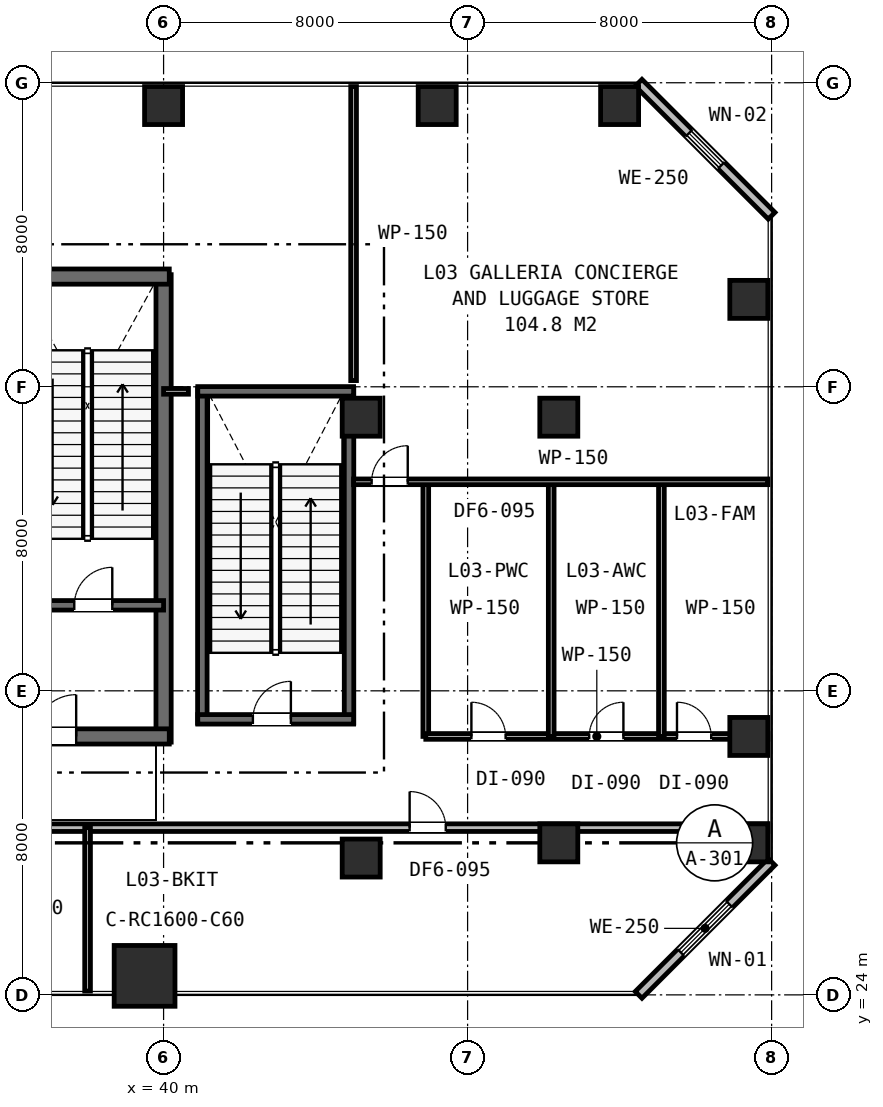
"""IFC4 building model, lengths in metres.
Left out: names, types, materials, properties, quantities, classifications, styles, units other than length and angle.
Written with IfcOpenShell. Run it as: python <this file> out.ifc"""

import sys

from ifc_helpers import new_model, si_unit, direction, frame, frame_2d, origin, origin_2d, place, context, subcontext, project, spatial, rectangle, extrude, element, fill, save


model = new_model("IFC4")
c1 = context("Model", 3, precision=1e-05, world=origin(), true_north=direction((0.0, 1.0)))
c2 = subcontext(c1, "Body", "Model", "MODEL_VIEW")
j1 = project(units=[si_unit("LENGTHUNIT", "METRE"), si_unit("PLANEANGLEUNIT", "RADIAN")], contexts=[c1])
p1 = place(None, origin())
s1 = spatial("IfcSite", under=j1, at=p1, CompositionType="ELEMENT")
p2 = place(p1, origin())
s2 = spatial("IfcBuilding", under=s1, at=p2, CompositionType="ELEMENT")
p3 = place(p2, frame((0.0, 0.0, 15.9)))
s3 = spatial("IfcBuildingStorey", under=s2, at=p3, CompositionType="ELEMENT", Elevation=15.9)
p4 = place(p3, frame((40.0, 30.65, 0.0), z_axis=(0.0, 0.0, 1.0), x_axis=(0.0, 1.0, 0.0)))
e1 = element("IfcWall", 1, at=p4, inside=s3, PredefinedType="SHEAR", context=c2, shape_type="SweptSolid", body=[
    extrude(rectangle(XDim=12.3, YDim=0.4, at=frame_2d((6.15, 0.0))), origin(), (0.0, 0.0, 1.0), 5.4),
])
p5 = place(p3, frame((15.85, 42.9, 0.0), z_axis=(0.0, 0.0, 1.0), x_axis=(1.0, 0.0, 0.0)))
e2 = element("IfcWall", 2, at=p5, inside=s3, PredefinedType="SHEAR", context=c2, shape_type="SweptSolid", body=[
    extrude(rectangle(XDim=24.3, YDim=0.4, at=frame_2d((12.15, 0.0))), origin(), (0.0, 0.0, 1.0), 5.4),
])
p6 = place(p3, frame((28.95, 30.8, 0.0), z_axis=(0.0, 0.0, 1.0), x_axis=(1.0, 0.0, 0.0)))
e3 = element("IfcWall", 3, at=p6, inside=s3, PredefinedType="SHEAR", context=c2, shape_type="SweptSolid", body=[
    extrude(rectangle(XDim=11.2, YDim=0.4, at=frame_2d((5.6, 0.0))), origin(), (0.0, 0.0, 1.0), 5.4),
])
p7 = place(p6, frame((7.65, 0.0, 0.0)))
e4 = element("IfcOpeningElement", 4, at=p7, cuts=e3, PredefinedType="OPENING", context=c2, shape_type="SweptSolid", body=[
    extrude(rectangle(XDim=1.1, YDim=2.15, at=frame_2d((0.55, 1.075))), frame((0.0, 0.21, 0.0), z_axis=(0.0, -1.0, 0.0), x_axis=(1.0, 0.0, 0.0)), (0.0, 0.0, 1.0), 0.42),
])
p8 = place(p3, frame((33.95, 34.25, 0.0), z_axis=(0.0, 0.0, 1.0), x_axis=(1.0, 0.0, 0.0)))
e5 = element("IfcWall", 5, at=p8, inside=s3, PredefinedType="SHEAR", context=c2, shape_type="SweptSolid", body=[
    extrude(rectangle(XDim=6.05, YDim=0.25, at=frame_2d((3.025, 0.0))), origin(), (0.0, 0.0, 1.0), 5.4),
])
p9 = place(p8, frame((3.7, 0.0, 0.0)))
e6 = element("IfcOpeningElement", 6, at=p9, cuts=e5, PredefinedType="OPENING", context=c2, shape_type="SweptSolid", body=[
    extrude(rectangle(XDim=1.0, YDim=2.15, at=frame_2d((0.5, 1.075))), frame((0.0, 0.135, 0.0), z_axis=(0.0, -1.0, 0.0), x_axis=(1.0, 0.0, 0.0)), (0.0, 0.0, 1.0), 0.27),
])
p10 = place(p8, frame((0.55, 0.0, 0.0)))
e7 = element("IfcOpeningElement", 7, at=p10, cuts=e5, PredefinedType="OPENING", context=c2, shape_type="SweptSolid", body=[
    extrude(rectangle(XDim=1.1, YDim=2.15, at=frame_2d((0.55, 1.075))), frame((0.0, 0.135, 0.0), z_axis=(0.0, -1.0, 0.0), x_axis=(1.0, 0.0, 0.0)), (0.0, 0.0, 1.0), 0.27),
])
for number, where, z_axis, x_axis in (
    (8, (41.02, 31.15, 0.0), (0.0, 0.0, 1.0), (0.0, 1.0, 0.0)),
    (9, (44.88, 31.15, 0.0), (0.0, 0.0, 1.0), (0.0, 1.0, 0.0)),
):
    element("IfcWall", number, at=place(p3, frame(where, z_axis=z_axis, x_axis=x_axis)), inside=s3, PredefinedType="SHEAR", context=c2, shape_type="SweptSolid", body=[
        extrude(rectangle(XDim=8.8, YDim=0.25, at=frame_2d((4.4, 0.0))), origin(), (0.0, 0.0, 1.0), 5.4),
    ])
p11 = place(p3, frame((40.9, 39.88, 0.0), z_axis=(0.0, 0.0, 1.0), x_axis=(1.0, 0.0, 0.0)))
e10 = element("IfcWall", 10, at=p11, inside=s3, PredefinedType="SHEAR", context=c2, shape_type="SweptSolid", body=[
    extrude(rectangle(XDim=4.1, YDim=0.25, at=frame_2d((2.05, 0.0))), origin(), (0.0, 0.0, 1.0), 5.4),
])
p12 = place(p3, frame((40.9, 31.25, 0.0), z_axis=(0.0, 0.0, 1.0), x_axis=(1.0, 0.0, 0.0)))
e11 = element("IfcWall", 11, at=p12, inside=s3, PredefinedType="SHEAR", context=c2, shape_type="SweptSolid", body=[
    extrude(rectangle(XDim=4.1, YDim=0.25, at=frame_2d((2.05, 0.0))), origin(), (0.0, 0.0, 1.0), 5.4),
])
p13 = place(p12, frame((1.45, 0.0, 0.0)))
e12 = element("IfcOpeningElement", 12, at=p13, cuts=e11, PredefinedType="OPENING", context=c2, shape_type="SweptSolid", body=[
    extrude(rectangle(XDim=1.0, YDim=2.15, at=frame_2d((0.5, 1.075))), frame((0.0, 0.135, 0.0), z_axis=(0.0, -1.0, 0.0), x_axis=(1.0, 0.0, 0.0)), (0.0, 0.0, 1.0), 0.27),
])
p14 = place(p3, frame((39.5, 24.5, 0.0), z_axis=(0.0, 0.0, 1.0), x_axis=(1.0, 0.0, 0.0)))
e13 = element("IfcColumn", 13, at=p14, inside=s3, PredefinedType="COLUMN", context=c2, shape_type="SweptSolid", body=[
    extrude(rectangle(XDim=1.6, YDim=1.6, at=origin_2d()), origin(), (0.0, 0.0, 1.0), 5.4),
])
for number, where, z_axis, x_axis in (
    (14, (45.2, 27.6, 0.0), (0.0, 0.0, 1.0), (1.0, 0.0, 0.0)),
    (15, (45.2, 39.2, 0.0), (0.0, 0.0, 1.0), (1.0, 0.0, 0.0)),
    (16, (40.0, 47.4, 0.0), (0.0, 0.0, 1.0), (1.0, 0.0, 0.0)),
    (17, (47.2, 47.4, 0.0), (0.0, 0.0, 1.0), (1.0, 0.0, 0.0)),
    (18, (50.4, 28.0, 0.0), (0.0, 0.0, 1.0), (1.0, 0.0, 0.0)),
    (19, (50.4, 39.2, 0.0), (0.0, 0.0, 1.0), (1.0, 0.0, 0.0)),
    (20, (55.4, 28.0, 0.0), (0.0, 0.0, 1.0), (1.0, 0.0, 0.0)),
    (21, (55.4, 30.8, 0.0), (0.0, 0.0, 1.0), (1.0, 0.0, 0.0)),
    (22, (55.4, 42.3, 0.0), (0.0, 0.0, 1.0), (1.0, 0.0, 0.0)),
    (23, (52.0, 47.4, 0.0), (0.0, 0.0, 1.0), (1.0, 0.0, 0.0)),
):
    element("IfcColumn", number, at=place(p3, frame(where, z_axis=z_axis, x_axis=x_axis)), inside=s3, PredefinedType="COLUMN", context=c2, shape_type="SweptSolid", body=[
        extrude(rectangle(XDim=1.0, YDim=1.0, at=origin_2d()), origin(), (0.0, 0.0, 1.0), 5.4),
    ])
p15 = place(p3, frame((52.5, 24.0, 0.0), z_axis=(0.0, 0.0, 1.0), x_axis=(0.707106781187, 0.707106781187, 0.0)))
e24 = element("IfcWall", 24, at=p15, inside=s3, PredefinedType="STANDARD", context=c2, shape_type="SweptSolid", body=[
    extrude(rectangle(XDim=4.95, YDim=0.25, at=frame_2d((2.475, 0.0))), origin(), (0.0, 0.0, 1.0), 4.94),
])
p16 = place(p15, frame((1.575, 0.0, 0.75)))
e25 = element("IfcOpeningElement", 25, at=p16, cuts=e24, PredefinedType="OPENING", context=c2, shape_type="SweptSolid", body=[
    extrude(rectangle(XDim=1.8, YDim=1.85, at=frame_2d((0.9, 0.925))), frame((0.0, 0.135, 0.0), z_axis=(0.0, -1.0, 0.0), x_axis=(1.0, 0.0, 0.0)), (0.0, 0.0, 1.0), 0.27),
])
p17 = place(p3, frame((56.0, 44.5, 0.0), z_axis=(0.0, 0.0, 1.0), x_axis=(-0.707106781187, 0.707106781187, 0.0)))
e26 = element("IfcWall", 26, at=p17, inside=s3, PredefinedType="STANDARD", context=c2, shape_type="SweptSolid", body=[
    extrude(rectangle(XDim=4.95, YDim=0.25, at=frame_2d((2.475, 0.0))), origin(), (0.0, 0.0, 1.0), 4.94),
])
p18 = place(p17, frame((1.875, 0.0, 0.85)))
e27 = element("IfcOpeningElement", 27, at=p18, cuts=e26, PredefinedType="OPENING", context=c2, shape_type="SweptSolid", body=[
    extrude(rectangle(XDim=1.2, YDim=1.6, at=frame_2d((0.6, 0.8))), frame((0.0, 0.135, 0.0), z_axis=(0.0, -1.0, 0.0), x_axis=(1.0, 0.0, 0.0)), (0.0, 0.0, 1.0), 0.27),
])
p19 = place(p3, frame((46.9, 30.8, 0.0), z_axis=(0.0, 0.0, 1.0), x_axis=(0.0, 1.0, 0.0)))
e28 = element("IfcWall", 28, at=p19, inside=s3, PredefinedType="PARTITIONING", context=c2, shape_type="SweptSolid", body=[
    extrude(rectangle(XDim=6.7, YDim=0.15, at=frame_2d((3.35, 0.0))), origin(), (0.0, 0.0, 1.0), 4.29),
])
p20 = place(p3, frame((46.9, 30.8, 0.0), z_axis=(0.0, 0.0, 1.0), x_axis=(1.0, 0.0, 0.0)))
e29 = element("IfcWall", 29, at=p20, inside=s3, PredefinedType="PARTITIONING", context=c2, shape_type="SweptSolid", body=[
    extrude(rectangle(XDim=9.0, YDim=0.15, at=frame_2d((4.5, 0.0))), origin(), (0.0, 0.0, 1.0), 2.98),
])
p21 = place(p20, frame((1.2, 0.0, 0.0)))
e30 = element("IfcOpeningElement", 30, at=p21, cuts=e29, PredefinedType="OPENING", context=c2, shape_type="SweptSolid", body=[
    extrude(rectangle(XDim=0.9, YDim=2.15, at=frame_2d((0.45, 1.075))), frame((0.0, 0.085, 0.0), z_axis=(0.0, -1.0, 0.0), x_axis=(1.0, 0.0, 0.0)), (0.0, 0.0, 1.0), 0.17),
])
p22 = place(p20, frame((4.3, 0.0, 0.0)))
e31 = element("IfcOpeningElement", 31, at=p22, cuts=e29, PredefinedType="OPENING", context=c2, shape_type="SweptSolid", body=[
    extrude(rectangle(XDim=0.9, YDim=2.15, at=frame_2d((0.45, 1.075))), frame((0.0, 0.085, 0.0), z_axis=(0.0, -1.0, 0.0), x_axis=(1.0, 0.0, 0.0)), (0.0, 0.0, 1.0), 0.17),
])
p23 = place(p20, frame((6.61, 0.0, 0.0)))
e32 = element("IfcOpeningElement", 32, at=p23, cuts=e29, PredefinedType="OPENING", context=c2, shape_type="SweptSolid", body=[
    extrude(rectangle(XDim=0.9, YDim=2.15, at=frame_2d((0.45, 1.075))), frame((0.0, 0.085, 0.0), z_axis=(0.0, -1.0, 0.0), x_axis=(1.0, 0.0, 0.0)), (0.0, 0.0, 1.0), 0.17),
])
p24 = place(p3, frame((50.2, 30.8, 0.0), z_axis=(0.0, 0.0, 1.0), x_axis=(0.0, 1.0, 0.0)))
e33 = element("IfcWall", 33, at=p24, inside=s3, PredefinedType="PARTITIONING", context=c2, shape_type="SweptSolid", body=[
    extrude(rectangle(XDim=6.7, YDim=0.15, at=frame_2d((3.35, 0.0))), origin(), (0.0, 0.0, 1.0), 2.98),
])
p25 = place(p3, frame((53.1, 30.8, 0.0), z_axis=(0.0, 0.0, 1.0), x_axis=(0.0, 1.0, 0.0)))
e34 = element("IfcWall", 34, at=p25, inside=s3, PredefinedType="PARTITIONING", context=c2, shape_type="SweptSolid", body=[
    extrude(rectangle(XDim=6.7, YDim=0.15, at=frame_2d((3.35, 0.0))), origin(), (0.0, 0.0, 1.0), 4.29),
])
p26 = place(p3, frame((45.0, 37.5, 0.0), z_axis=(0.0, 0.0, 1.0), x_axis=(1.0, 0.0, 0.0)))
e35 = element("IfcWall", 35, at=p26, inside=s3, PredefinedType="PARTITIONING", context=c2, shape_type="SweptSolid", body=[
    extrude(rectangle(XDim=10.9, YDim=0.15, at=frame_2d((5.45, 0.0))), origin(), (0.0, 0.0, 1.0), 2.98),
])
p27 = place(p26, frame((0.475, 0.0, 0.0)))
e36 = element("IfcOpeningElement", 36, at=p27, cuts=e35, PredefinedType="OPENING", context=c2, shape_type="SweptSolid", body=[
    extrude(rectangle(XDim=0.95, YDim=2.15, at=frame_2d((0.475, 1.075))), frame((0.0, 0.085, 0.0), z_axis=(0.0, -1.0, 0.0), x_axis=(1.0, 0.0, 0.0)), (0.0, 0.0, 1.0), 0.17),
])
p28 = place(p3, frame((45.0, 40.163, 0.0), z_axis=(0.0, 0.0, 1.0), x_axis=(0.0, 1.0, 0.0)))
e37 = element("IfcWall", 37, at=p28, inside=s3, PredefinedType="PARTITIONING", context=c2, shape_type="SweptSolid", body=[
    extrude(rectangle(XDim=7.737, YDim=0.15, at=frame_2d((3.868, 0.0))), origin(), (0.0, 0.0, 1.0), 2.98),
])
p29 = place(p3, frame((40.0, 39.88, 0.0), z_axis=(0.0, 0.0, 1.0), x_axis=(1.0, 0.0, 0.0)))
e38 = element("IfcWall", 38, at=p29, inside=s3, PredefinedType="PARTITIONING", context=c2, shape_type="SweptSolid", body=[
    extrude(rectangle(XDim=0.655, YDim=0.15, at=frame_2d((0.328, 0.0))), origin(), (0.0, 0.0, 1.0), 2.98),
])
p30 = place(p3, frame((0.1, 28.4, 0.0), z_axis=(0.0, 0.0, 1.0), x_axis=(1.0, 0.0, 0.0)))
e39 = element("IfcWall", 39, at=p30, inside=s3, PredefinedType="PARTITIONING", context=c2, shape_type="SweptSolid", body=[
    extrude(rectangle(XDim=55.8, YDim=0.2, at=frame_2d((27.9, 0.0))), origin(), (0.0, 0.0, 1.0), 2.98),
])
p31 = place(p30, frame((24.44, 0.0, 0.0)))
e40 = element("IfcOpeningElement", 40, at=p31, cuts=e39, PredefinedType="OPENING", context=c2, shape_type="SweptSolid", body=[
    extrude(rectangle(XDim=1.8, YDim=2.15, at=frame_2d((0.9, 1.075))), frame((0.0, 0.11, 0.0), z_axis=(0.0, -1.0, 0.0), x_axis=(1.0, 0.0, 0.0)), (0.0, 0.0, 1.0), 0.22),
])
p32 = place(p30, frame((46.375, 0.0, 0.0)))
e41 = element("IfcOpeningElement", 41, at=p32, cuts=e39, PredefinedType="OPENING", context=c2, shape_type="SweptSolid", body=[
    extrude(rectangle(XDim=0.95, YDim=2.15, at=frame_2d((0.475, 1.075))), frame((0.0, 0.11, 0.0), z_axis=(0.0, -1.0, 0.0), x_axis=(1.0, 0.0, 0.0)), (0.0, 0.0, 1.0), 0.22),
])
p33 = place(p3, frame((38.0, 24.1, 0.0), z_axis=(0.0, 0.0, 1.0), x_axis=(0.0, 1.0, 0.0)))
e42 = element("IfcWall", 42, at=p33, inside=s3, PredefinedType="PARTITIONING", context=c2, shape_type="SweptSolid", body=[
    extrude(rectangle(XDim=4.3, YDim=0.15, at=frame_2d((2.15, 0.0))), origin(), (0.0, 0.0, 1.0), 4.48),
])
p34 = place(p16, origin())
e43 = element("IfcWindow", 43, at=p34, inside=s3, PartitioningType="SINGLE_PANEL", PredefinedType="WINDOW", context=c2, shape_type="SweptSolid", body=[
    extrude(rectangle(XDim=1.8, YDim=1.85, at=frame_2d((0.9, 0.925))), frame((0.0, 0.03, 0.0), z_axis=(0.0, -1.0, 0.0), x_axis=(1.0, 0.0, 0.0)), (0.0, 0.0, 1.0), 0.06),
])
fill(e25, e43)
p35 = place(p18, origin())
e44 = element("IfcWindow", 44, at=p35, inside=s3, PartitioningType="SINGLE_PANEL", PredefinedType="WINDOW", context=c2, shape_type="SweptSolid", body=[
    extrude(rectangle(XDim=1.2, YDim=1.6, at=frame_2d((0.6, 0.8))), frame((0.0, 0.03, 0.0), z_axis=(0.0, -1.0, 0.0), x_axis=(1.0, 0.0, 0.0)), (0.0, 0.0, 1.0), 0.06),
])
fill(e27, e44)
p36 = place(p9, origin())
e45 = element("IfcDoor", 45, at=p36, inside=s3, OperationType="SINGLE_SWING_RIGHT", PredefinedType="DOOR", context=c2, shape_type="SweptSolid", body=[
    extrude(rectangle(XDim=1.0, YDim=2.15, at=frame_2d((0.5, 1.075))), frame((0.0, 0.025, 0.0), z_axis=(0.0, -1.0, 0.0), x_axis=(1.0, 0.0, 0.0)), (0.0, 0.0, 1.0), 0.05),
])
fill(e6, e45)
p37 = place(p7, origin())
e46 = element("IfcDoor", 46, at=p37, inside=s3, OperationType="SINGLE_SWING_RIGHT", PredefinedType="DOOR", context=c2, shape_type="SweptSolid", body=[
    extrude(rectangle(XDim=1.1, YDim=2.15, at=frame_2d((0.55, 1.075))), frame((0.0, 0.025, 0.0), z_axis=(0.0, -1.0, 0.0), x_axis=(1.0, 0.0, 0.0)), (0.0, 0.0, 1.0), 0.05),
])
fill(e4, e46)
p38 = place(p13, origin())
e47 = element("IfcDoor", 47, at=p38, inside=s3, OperationType="SINGLE_SWING_RIGHT", PredefinedType="DOOR", context=c2, shape_type="SweptSolid", body=[
    extrude(rectangle(XDim=1.0, YDim=2.15, at=frame_2d((0.5, 1.075))), frame((0.0, 0.025, 0.0), z_axis=(0.0, -1.0, 0.0), x_axis=(1.0, 0.0, 0.0)), (0.0, 0.0, 1.0), 0.05),
])
fill(e12, e47)
p39 = place(p21, origin())
e48 = element("IfcDoor", 48, at=p39, inside=s3, OperationType="SINGLE_SWING_LEFT", PredefinedType="DOOR", context=c2, shape_type="SweptSolid", body=[
    extrude(rectangle(XDim=0.9, YDim=2.15, at=frame_2d((0.45, 1.075))), frame((0.0, 0.025, 0.0), z_axis=(0.0, -1.0, 0.0), x_axis=(1.0, 0.0, 0.0)), (0.0, 0.0, 1.0), 0.05),
])
fill(e30, e48)
p40 = place(p22, origin())
e49 = element("IfcDoor", 49, at=p40, inside=s3, OperationType="SINGLE_SWING_RIGHT", PredefinedType="DOOR", context=c2, shape_type="SweptSolid", body=[
    extrude(rectangle(XDim=0.9, YDim=2.15, at=frame_2d((0.45, 1.075))), frame((0.0, 0.025, 0.0), z_axis=(0.0, -1.0, 0.0), x_axis=(1.0, 0.0, 0.0)), (0.0, 0.0, 1.0), 0.05),
])
fill(e31, e49)
p41 = place(p23, origin())
e50 = element("IfcDoor", 50, at=p41, inside=s3, OperationType="SINGLE_SWING_LEFT", PredefinedType="DOOR", context=c2, shape_type="SweptSolid", body=[
    extrude(rectangle(XDim=0.9, YDim=2.15, at=frame_2d((0.45, 1.075))), frame((0.0, 0.025, 0.0), z_axis=(0.0, -1.0, 0.0), x_axis=(1.0, 0.0, 0.0)), (0.0, 0.0, 1.0), 0.05),
])
fill(e32, e50)
p42 = place(p27, origin())
e51 = element("IfcDoor", 51, at=p42, inside=s3, OperationType="SINGLE_SWING_RIGHT", PredefinedType="DOOR", context=c2, shape_type="SweptSolid", body=[
    extrude(rectangle(XDim=0.95, YDim=2.15, at=frame_2d((0.475, 1.075))), frame((0.0, 0.025, 0.0), z_axis=(0.0, -1.0, 0.0), x_axis=(1.0, 0.0, 0.0)), (0.0, 0.0, 1.0), 0.05),
])
fill(e36, e51)
p43 = place(p32, origin())
e52 = element("IfcDoor", 52, at=p43, inside=s3, OperationType="SINGLE_SWING_LEFT", PredefinedType="DOOR", context=c2, shape_type="SweptSolid", body=[
    extrude(rectangle(XDim=0.95, YDim=2.15, at=frame_2d((0.475, 1.075))), frame((0.0, 0.025, 0.0), z_axis=(0.0, -1.0, 0.0), x_axis=(1.0, 0.0, 0.0)), (0.0, 0.0, 1.0), 0.05),
])
fill(e41, e52)
save(model, sys.argv[1])
